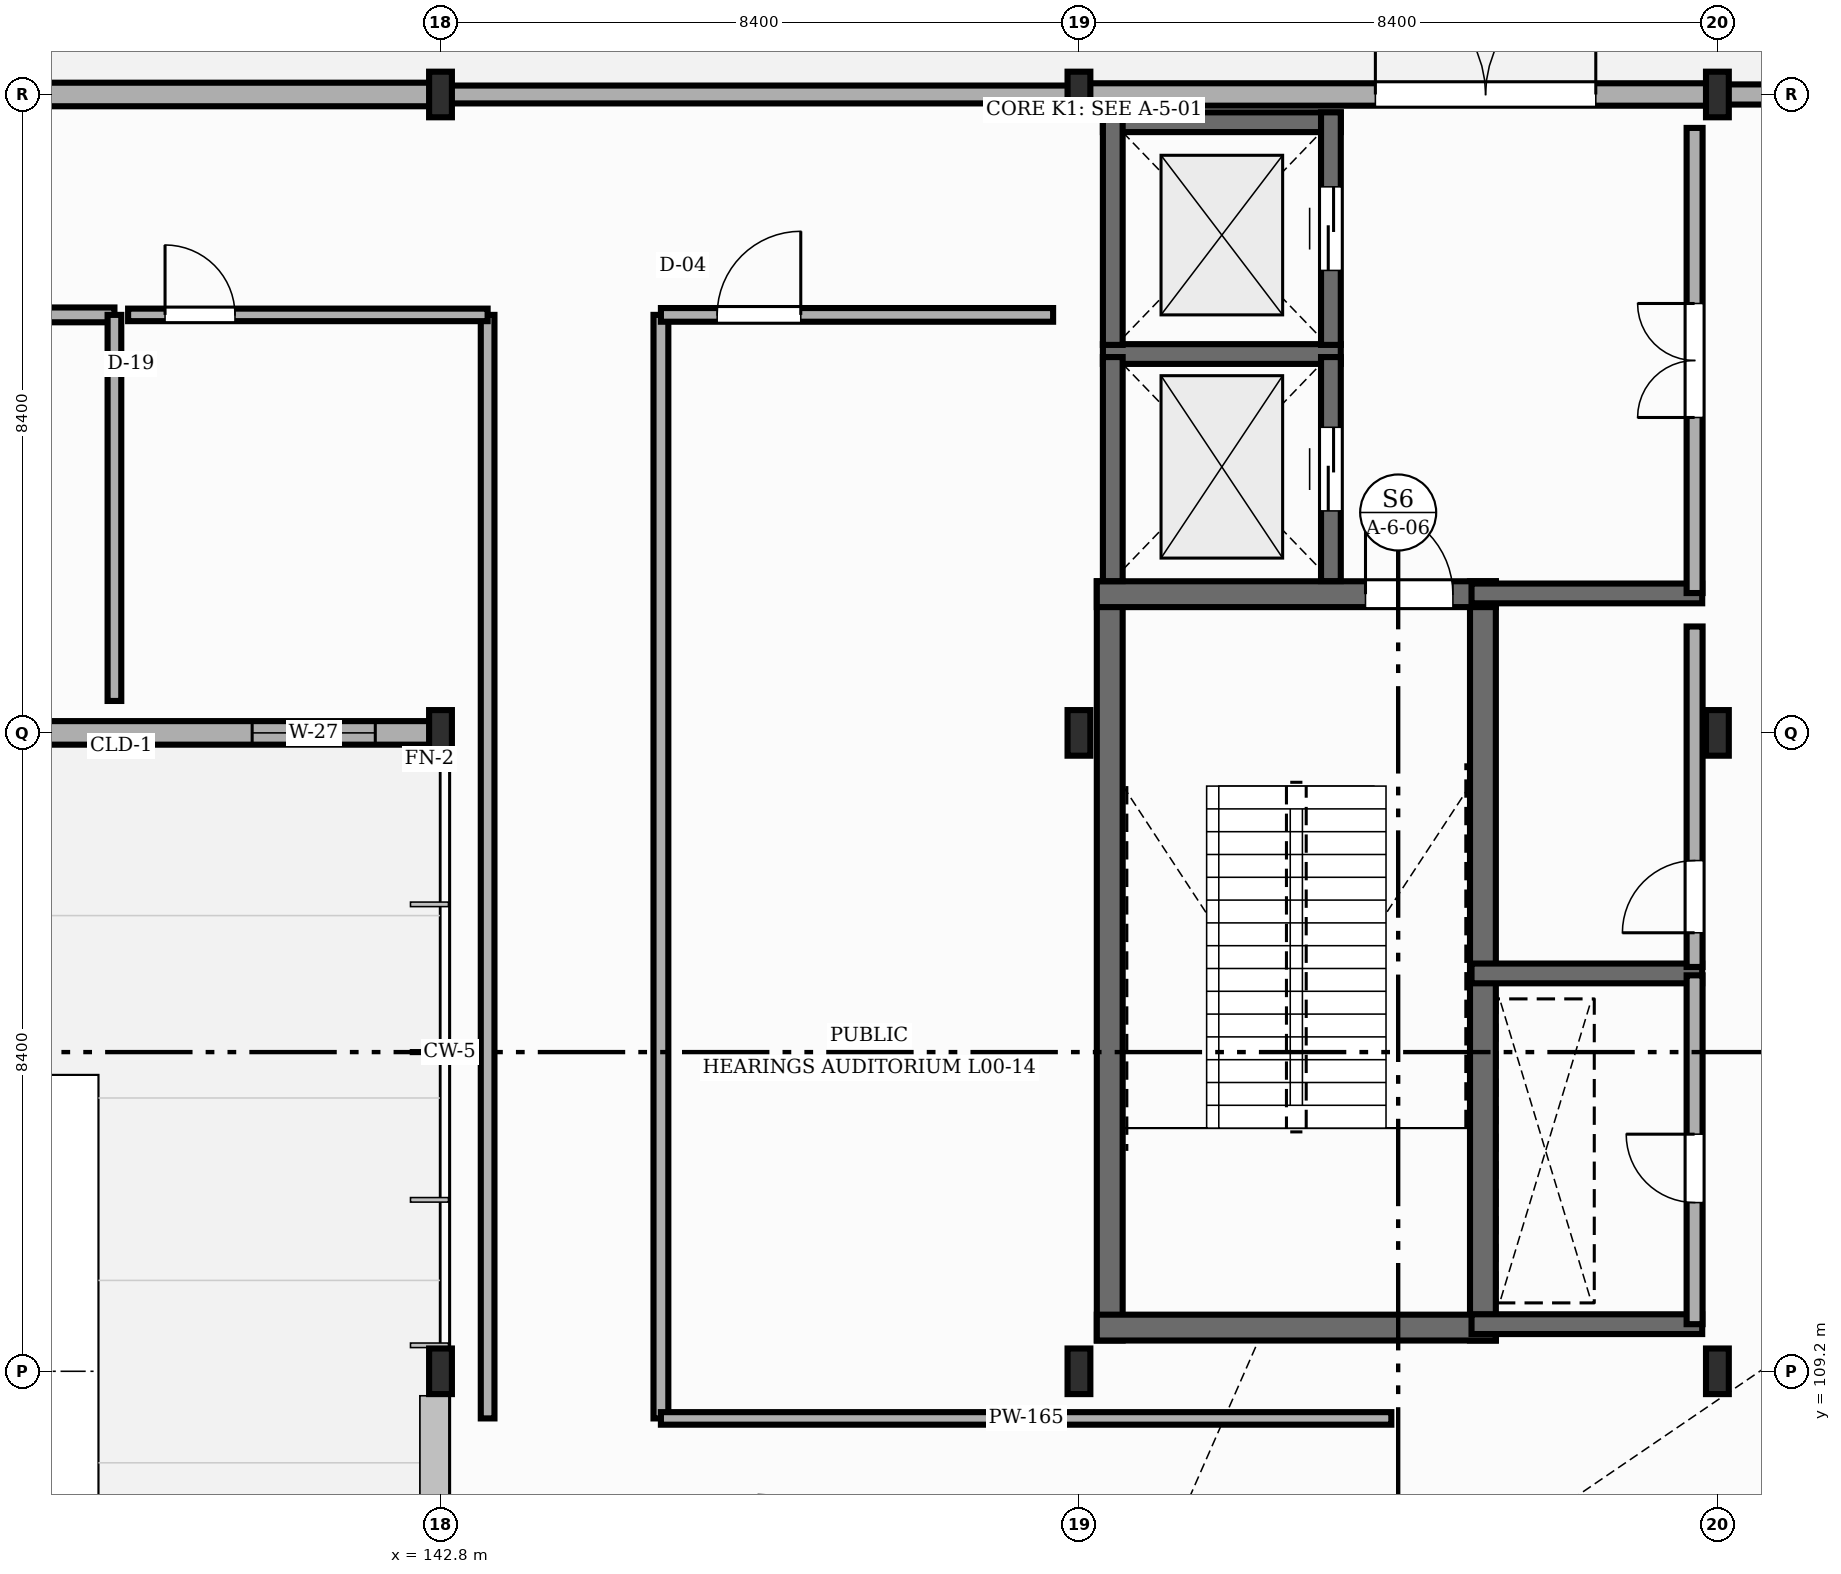
"""IFC4 building model, lengths in metres.
Left out: names, types, materials, properties, quantities, classifications, styles, units other than length and angle.
Written with IfcOpenShell. Run it as: python <this file> out.ifc"""

import sys

from ifc_helpers import new_model, si_unit, direction, frame, frame_2d, origin, origin_2d, place, context, subcontext, project, spatial, rectangle, i_section, extrude, element, fill, save


model = new_model("IFC4")
c1 = context("Model", 3, precision=1e-05, world=origin(), true_north=direction((0.0, 1.0)))
c2 = subcontext(c1, "Body", "Model", "MODEL_VIEW")
j1 = project(units=[si_unit("LENGTHUNIT", "METRE"), si_unit("PLANEANGLEUNIT", "RADIAN")], contexts=[c1])
p1 = place(None, origin())
s1 = spatial("IfcSite", under=j1, at=p1, CompositionType="ELEMENT")
p2 = place(p1, origin())
s2 = spatial("IfcBuilding", under=s1, at=p2, CompositionType="ELEMENT")
p3 = place(p2, origin())
s3 = spatial("IfcBuildingStorey", under=s2, at=p3, CompositionType="ELEMENT", Elevation=0.0)
for number, where, z_axis, x_axis in (
    (1, (142.8, 109.2, 0.0), (0.0, 0.0, 1.0), (1.0, 0.0, 0.0)),
    (2, (142.8, 117.6, 0.0), (0.0, 0.0, 1.0), (1.0, 0.0, 0.0)),
    (3, (142.8, 126.0, 0.0), (0.0, 0.0, 1.0), (1.0, 0.0, 0.0)),
    (4, (151.2, 109.2, 0.0), (0.0, 0.0, 1.0), (1.0, 0.0, 0.0)),
    (5, (151.2, 117.6, 0.0), (0.0, 0.0, 1.0), (1.0, 0.0, 0.0)),
    (6, (151.2, 126.0, 0.0), (0.0, 0.0, 1.0), (1.0, 0.0, 0.0)),
    (7, (159.6, 109.2, 0.0), (0.0, 0.0, 1.0), (1.0, 0.0, 0.0)),
    (8, (159.6, 117.6, 0.0), (0.0, 0.0, 1.0), (1.0, 0.0, 0.0)),
    (9, (159.6, 126.0, 0.0), (0.0, 0.0, 1.0), (1.0, 0.0, 0.0)),
):
    element("IfcColumn", number, at=place(p3, frame(where, z_axis=z_axis, x_axis=x_axis)), inside=s3, PredefinedType="COLUMN", context=c2, shape_type="SweptSolid", body=[
        extrude(i_section(OverallWidth=0.3, OverallDepth=0.6, WebThickness=0.015, FlangeThickness=0.03, FilletRadius=0.027, at=origin_2d()), origin(), (0.0, 0.0, 1.0), 5.4),
    ])
p4 = place(p3, frame((134.408, 117.6, 0.0), z_axis=(0.0, 0.0, 1.0), x_axis=(1.0, 0.0, 0.0)))
e10 = element("IfcWall", 10, at=p4, inside=s3, PredefinedType="STANDARD", context=c2, shape_type="SweptSolid", body=[
    extrude(rectangle(XDim=8.384, YDim=0.31, at=frame_2d((4.192, 0.0))), origin(), (0.0, 0.0, 1.0), 4.797),
])
p5 = place(p4, frame((0.85, 0.0, 0.9)))
e11 = element("IfcOpeningElement", 11, at=p5, cuts=e10, PredefinedType="OPENING", context=c2, shape_type="SweptSolid", body=[
    extrude(rectangle(XDim=1.52, YDim=1.45, at=frame_2d((0.76, 0.725))), frame((0.0, 0.165, 0.0), z_axis=(0.0, -1.0, 0.0), x_axis=(1.0, 0.0, 0.0)), (0.0, 0.0, 1.0), 0.33),
])
p6 = place(p4, frame((5.914, 0.0, 0.9)))
e12 = element("IfcOpeningElement", 12, at=p6, cuts=e10, PredefinedType="OPENING", context=c2, shape_type="SweptSolid", body=[
    extrude(rectangle(XDim=1.62, YDim=1.45, at=frame_2d((0.81, 0.725))), frame((0.0, 0.165, 0.0), z_axis=(0.0, -1.0, 0.0), x_axis=(1.0, 0.0, 0.0)), (0.0, 0.0, 1.0), 0.33),
])
p7 = place(p3, frame((167.992, 126.0, 0.0), z_axis=(0.0, 0.0, 1.0), x_axis=(-1.0, 0.0, 0.0)))
e13 = element("IfcWall", 13, at=p7, inside=s3, PredefinedType="STANDARD", context=c2, shape_type="SweptSolid", body=[
    extrude(rectangle(XDim=8.384, YDim=0.265, at=frame_2d((4.192, 0.0))), origin(), (0.0, 0.0, 1.0), 4.797),
])
p8 = place(p3, frame((151.208, 126.0, 0.0), z_axis=(0.0, 0.0, 1.0), x_axis=(1.0, 0.0, 0.0)))
e14 = element("IfcWall", 14, at=p8, inside=s3, PredefinedType="STANDARD", context=c2, shape_type="SweptSolid", body=[
    extrude(rectangle(XDim=8.384, YDim=0.295, at=frame_2d((4.192, 0.0))), origin(), (0.0, 0.0, 1.0), 4.827),
])
p9 = place(p8, frame((3.892, 0.0, 0.0)))
e15 = element("IfcOpeningElement", 15, at=p9, cuts=e14, PredefinedType="OPENING", context=c2, shape_type="SweptSolid", body=[
    extrude(rectangle(XDim=2.9, YDim=2.38, at=frame_2d((1.45, 1.19))), frame((0.0, 0.157, 0.0), z_axis=(0.0, -1.0, 0.0), x_axis=(1.0, 0.0, 0.0)), (0.0, 0.0, 1.0), 0.315),
])
p10 = place(p3, frame((151.192, 126.0, 0.0), z_axis=(0.0, 0.0, 1.0), x_axis=(-1.0, 0.0, 0.0)))
e16 = element("IfcWall", 16, at=p10, inside=s3, PredefinedType="STANDARD", context=c2, shape_type="SweptSolid", body=[
    extrude(rectangle(XDim=8.384, YDim=0.235, at=frame_2d((4.192, 0.0))), origin(), (0.0, 0.0, 1.0), 4.797),
])
p11 = place(p3, frame((142.792, 126.0, 0.0), z_axis=(0.0, 0.0, 1.0), x_axis=(-1.0, 0.0, 0.0)))
e17 = element("IfcWall", 17, at=p11, inside=s3, PredefinedType="STANDARD", context=c2, shape_type="SweptSolid", body=[
    extrude(rectangle(XDim=8.384, YDim=0.31, at=frame_2d((4.192, 0.0))), origin(), (0.0, 0.0, 1.0), 4.827),
])
for number, where, z_axis, x_axis in (
    (18, (151.605, 109.605, 0.0), (0.0, 0.0, 1.0), (0.0, 1.0, 0.0)),
    (19, (156.515, 109.605, 0.0), (0.0, 0.0, 1.0), (0.0, 1.0, 0.0)),
):
    element("IfcWall", number, at=place(p3, frame(where, z_axis=z_axis, x_axis=x_axis)), inside=s3, PredefinedType="SHEAR", context=c2, shape_type="SweptSolid", body=[
        extrude(rectangle(XDim=9.99, YDim=0.34, at=frame_2d((4.995, 0.0))), origin(), (0.0, 0.0, 1.0), 5.175),
    ])
p12 = place(p3, frame((151.435, 109.775, 0.0), z_axis=(0.0, 0.0, 1.0), x_axis=(1.0, 0.0, 0.0)))
e20 = element("IfcWall", 20, at=p12, inside=s3, PredefinedType="SHEAR", context=c2, shape_type="SweptSolid", body=[
    extrude(rectangle(XDim=5.25, YDim=0.34, at=frame_2d((2.625, 0.0))), origin(), (0.0, 0.0, 1.0), 5.175),
])
p13 = place(p3, frame((151.435, 119.425, 0.0), z_axis=(0.0, 0.0, 1.0), x_axis=(1.0, 0.0, 0.0)))
e21 = element("IfcWall", 21, at=p13, inside=s3, PredefinedType="SHEAR", context=c2, shape_type="SweptSolid", body=[
    extrude(rectangle(XDim=5.25, YDim=0.34, at=frame_2d((2.625, 0.0))), origin(), (0.0, 0.0, 1.0), 5.175),
])
p14 = place(p13, frame((3.535, 0.0, 0.0)))
e22 = element("IfcOpeningElement", 22, at=p14, cuts=e21, PredefinedType="OPENING", context=c2, shape_type="SweptSolid", body=[
    extrude(rectangle(XDim=1.15, YDim=2.15, at=frame_2d((0.575, 1.075))), frame((0.0, 0.18, 0.0), z_axis=(0.0, -1.0, 0.0), x_axis=(1.0, 0.0, 0.0)), (0.0, 0.0, 1.0), 0.36),
])
p15 = place(p3, frame((151.515, 122.585, 0.0), z_axis=(0.0, 0.0, 1.0), x_axis=(1.0, 0.0, 0.0)))
e23 = element("IfcWall", 23, at=p15, inside=s3, PredefinedType="SHEAR", context=c2, shape_type="SweptSolid", body=[
    extrude(rectangle(XDim=3.13, YDim=0.26, at=frame_2d((1.565, 0.0))), origin(), (0.0, 0.0, 1.0), 5.175),
])
p16 = place(p3, frame((151.645, 119.597, 0.0), z_axis=(0.0, 0.0, 1.0), x_axis=(0.0, 1.0, 0.0)))
e24 = element("IfcWall", 24, at=p16, inside=s3, PredefinedType="SHEAR", context=c2, shape_type="SweptSolid", body=[
    extrude(rectangle(XDim=2.948, YDim=0.26, at=frame_2d((1.474, 0.0))), origin(), (0.0, 0.0, 1.0), 5.175),
])
p17 = place(p3, frame((154.515, 119.597, 0.0), z_axis=(0.0, 0.0, 1.0), x_axis=(0.0, 1.0, 0.0)))
e25 = element("IfcWall", 25, at=p17, inside=s3, PredefinedType="SHEAR", context=c2, shape_type="SweptSolid", body=[
    extrude(rectangle(XDim=2.948, YDim=0.26, at=frame_2d((1.474, 0.0))), origin(), (0.0, 0.0, 1.0), 5.175),
])
p18 = place(p17, frame((0.924, 0.0, 0.0)))
e26 = element("IfcOpeningElement", 26, at=p18, cuts=e25, PredefinedType="OPENING", context=c2, shape_type="SweptSolid", body=[
    extrude(rectangle(XDim=1.1, YDim=2.15, at=frame_2d((0.55, 1.075))), frame((0.0, 0.14, 0.0), z_axis=(0.0, -1.0, 0.0), x_axis=(1.0, 0.0, 0.0)), (0.0, 0.0, 1.0), 0.28),
])
p19 = place(p3, frame((151.515, 125.635, 0.0), z_axis=(0.0, 0.0, 1.0), x_axis=(1.0, 0.0, 0.0)))
e27 = element("IfcWall", 27, at=p19, inside=s3, PredefinedType="SHEAR", context=c2, shape_type="SweptSolid", body=[
    extrude(rectangle(XDim=3.13, YDim=0.26, at=frame_2d((1.565, 0.0))), origin(), (0.0, 0.0, 1.0), 5.175),
])
p20 = place(p3, frame((151.645, 122.705, 0.0), z_axis=(0.0, 0.0, 1.0), x_axis=(0.0, 1.0, 0.0)))
e28 = element("IfcWall", 28, at=p20, inside=s3, PredefinedType="SHEAR", context=c2, shape_type="SweptSolid", body=[
    extrude(rectangle(XDim=3.06, YDim=0.26, at=frame_2d((1.53, 0.0))), origin(), (0.0, 0.0, 1.0), 5.175),
])
p21 = place(p3, frame((154.515, 122.705, 0.0), z_axis=(0.0, 0.0, 1.0), x_axis=(0.0, 1.0, 0.0)))
e29 = element("IfcWall", 29, at=p21, inside=s3, PredefinedType="SHEAR", context=c2, shape_type="SweptSolid", body=[
    extrude(rectangle(XDim=3.06, YDim=0.26, at=frame_2d((1.53, 0.0))), origin(), (0.0, 0.0, 1.0), 5.175),
])
p22 = place(p21, frame((0.98, 0.0, 0.0)))
e30 = element("IfcOpeningElement", 30, at=p22, cuts=e29, PredefinedType="OPENING", context=c2, shape_type="SweptSolid", body=[
    extrude(rectangle(XDim=1.1, YDim=2.15, at=frame_2d((0.55, 1.075))), frame((0.0, 0.14, 0.0), z_axis=(0.0, -1.0, 0.0), x_axis=(1.0, 0.0, 0.0)), (0.0, 0.0, 1.0), 0.28),
])
for number, where, z_axis, x_axis in (
    (31, (156.365, 109.82, 0.0), (0.0, 0.0, 1.0), (1.0, 0.0, 0.0)),
    (32, (156.365, 114.435, 0.0), (0.0, 0.0, 1.0), (1.0, 0.0, 0.0)),
    (33, (156.365, 119.435, 0.0), (0.0, 0.0, 1.0), (1.0, 0.0, 0.0)),
):
    element("IfcWall", number, at=place(p3, frame(where, z_axis=z_axis, x_axis=x_axis)), inside=s3, PredefinedType="SHEAR", context=c2, shape_type="SweptSolid", body=[
        extrude(rectangle(XDim=3.035, YDim=0.26, at=frame_2d((1.518, 0.0))), origin(), (0.0, 0.0, 1.0), 5.175),
    ])
p23 = place(p3, frame((159.3, 109.82, 0.0), z_axis=(0.0, 0.0, 1.0), x_axis=(0.0, 1.0, 0.0)))
e34 = element("IfcWall", 34, at=p23, inside=s3, PredefinedType="STANDARD", context=c2, shape_type="SweptSolid", body=[
    extrude(rectangle(XDim=4.59, YDim=0.21, at=frame_2d((2.295, 0.0))), origin(), (0.0, 0.0, 1.0), 4.847),
])
p24 = place(p23, frame((1.6, 0.0, 0.0)))
e35 = element("IfcOpeningElement", 35, at=p24, cuts=e34, PredefinedType="OPENING", context=c2, shape_type="SweptSolid", body=[
    extrude(rectangle(XDim=0.9, YDim=2.1, at=frame_2d((0.45, 1.05))), frame((0.0, 0.115, 0.0), z_axis=(0.0, -1.0, 0.0), x_axis=(1.0, 0.0, 0.0)), (0.0, 0.0, 1.0), 0.23),
])
p25 = place(p3, frame((159.3, 114.52, 0.0), z_axis=(0.0, 0.0, 1.0), x_axis=(0.0, 1.0, 0.0)))
e36 = element("IfcWall", 36, at=p25, inside=s3, PredefinedType="STANDARD", context=c2, shape_type="SweptSolid", body=[
    extrude(rectangle(XDim=4.48, YDim=0.21, at=frame_2d((2.24, 0.0))), origin(), (0.0, 0.0, 1.0), 4.557),
])
p26 = place(p25, frame((0.45, 0.0, 0.0)))
e37 = element("IfcOpeningElement", 37, at=p26, cuts=e36, PredefinedType="OPENING", context=c2, shape_type="SweptSolid", body=[
    extrude(rectangle(XDim=0.95, YDim=2.15, at=frame_2d((0.475, 1.075))), frame((0.0, 0.115, 0.0), z_axis=(0.0, -1.0, 0.0), x_axis=(1.0, 0.0, 0.0)), (0.0, 0.0, 1.0), 0.23),
])
p27 = place(p3, frame((159.3, 119.44, 0.0), z_axis=(0.0, 0.0, 1.0), x_axis=(0.0, 1.0, 0.0)))
e38 = element("IfcWall", 38, at=p27, inside=s3, PredefinedType="STANDARD", context=c2, shape_type="SweptSolid", body=[
    extrude(rectangle(XDim=6.12, YDim=0.21, at=frame_2d((3.06, 0.0))), origin(), (0.0, 0.0, 1.0), 4.557),
])
p28 = place(p27, frame((2.31, 0.0, 0.0)))
e39 = element("IfcOpeningElement", 39, at=p28, cuts=e38, PredefinedType="OPENING", context=c2, shape_type="SweptSolid", body=[
    extrude(rectangle(XDim=1.5, YDim=2.2, at=frame_2d((0.75, 1.1))), frame((0.0, 0.115, 0.0), z_axis=(0.0, -1.0, 0.0), x_axis=(1.0, 0.0, 0.0)), (0.0, 0.0, 1.0), 0.23),
])
p29 = place(p3, frame((145.7, 108.58, -0.004), z_axis=(0.0, 0.0, 1.0), x_axis=(0.0, 1.0, 0.0)))
e40 = element("IfcWall", 40, at=p29, inside=s3, PredefinedType="STANDARD", context=c2, shape_type="SweptSolid", body=[
    extrude(rectangle(XDim=14.52, YDim=0.195, at=frame_2d((7.26, 0.0))), origin(), (0.0, 0.0, 1.0), 4.861),
])
p30 = place(p3, frame((145.7, 123.1, -0.004), z_axis=(0.0, 0.0, 1.0), x_axis=(1.0, 0.0, 0.0)))
e41 = element("IfcWall", 41, at=p30, inside=s3, PredefinedType="STANDARD", context=c2, shape_type="SweptSolid", body=[
    extrude(rectangle(XDim=5.16, YDim=0.18, at=frame_2d((2.58, 0.0))), origin(), (0.0, 0.0, 1.0), 5.179),
])
p31 = place(p30, frame((0.74, 0.0, 0.0)))
e42 = element("IfcOpeningElement", 42, at=p31, cuts=e41, PredefinedType="OPENING", context=c2, shape_type="SweptSolid", body=[
    extrude(rectangle(XDim=1.1, YDim=2.06, at=frame_2d((0.55, 1.03))), frame((0.0, 0.1, 0.0), z_axis=(0.0, -1.0, 0.0), x_axis=(1.0, 0.0, 0.0)), (0.0, 0.0, 1.0), 0.2),
])
p32 = place(p3, frame((155.31, 108.58, -0.004), z_axis=(0.0, 0.0, 1.0), x_axis=(-1.0, 0.0, 0.0)))
e43 = element("IfcWall", 43, at=p32, inside=s3, PredefinedType="STANDARD", context=c2, shape_type="SweptSolid", body=[
    extrude(rectangle(XDim=9.61, YDim=0.165, at=frame_2d((4.805, 0.0))), origin(), (0.0, 0.0, 1.0), 5.179),
])
p33 = place(p3, frame((123.18, 123.1, -0.004), z_axis=(0.0, 0.0, 1.0), x_axis=(1.0, 0.0, 0.0)))
e44 = element("IfcWall", 44, at=p33, inside=s3, PredefinedType="STANDARD", context=c2, shape_type="SweptSolid", body=[
    extrude(rectangle(XDim=15.33, YDim=0.195, at=frame_2d((7.665, 0.0))), origin(), (0.0, 0.0, 1.0), 5.179),
])
p34 = place(p3, frame((138.51, 123.1, -0.004), z_axis=(0.0, 0.0, 1.0), x_axis=(0.0, -1.0, 0.0)))
e45 = element("IfcWall", 45, at=p34, inside=s3, PredefinedType="STANDARD", context=c2, shape_type="SweptSolid", body=[
    extrude(rectangle(XDim=5.08, YDim=0.18, at=frame_2d((2.54, 0.0))), origin(), (0.0, 0.0, 1.0), 5.179),
])
p35 = place(p3, frame((143.42, 123.1, -0.004), z_axis=(0.0, 0.0, 1.0), x_axis=(0.0, -1.0, 0.0)))
e46 = element("IfcWall", 46, at=p35, inside=s3, PredefinedType="STANDARD", context=c2, shape_type="SweptSolid", body=[
    extrude(rectangle(XDim=14.52, YDim=0.18, at=frame_2d((7.26, 0.0))), origin(), (0.0, 0.0, 1.0), 5.179),
])
p36 = place(p3, frame((138.69, 123.1, -0.004), z_axis=(0.0, 0.0, 1.0), x_axis=(1.0, 0.0, 0.0)))
e47 = element("IfcWall", 47, at=p36, inside=s3, PredefinedType="STANDARD", context=c2, shape_type="SweptSolid", body=[
    extrude(rectangle(XDim=4.73, YDim=0.165, at=frame_2d((2.365, 0.0))), origin(), (0.0, 0.0, 1.0), 5.179),
])
p37 = place(p36, frame((0.486, 0.0, 0.0)))
e48 = element("IfcOpeningElement", 48, at=p37, cuts=e47, PredefinedType="OPENING", context=c2, shape_type="SweptSolid", body=[
    extrude(rectangle(XDim=0.92, YDim=2.22, at=frame_2d((0.46, 1.11))), frame((0.0, 0.093, 0.0), z_axis=(0.0, -1.0, 0.0), x_axis=(1.0, 0.0, 0.0)), (0.0, 0.0, 1.0), 0.185),
])
p38 = place(p6, origin())
e49 = element("IfcWindow", 49, at=p38, inside=s3, PartitioningType="SINGLE_PANEL", PredefinedType="WINDOW", context=c2, shape_type="SweptSolid", body=[
    extrude(rectangle(XDim=1.62, YDim=1.45, at=frame_2d((0.81, 0.725))), frame((0.0, 0.03, 0.0), z_axis=(0.0, -1.0, 0.0), x_axis=(1.0, 0.0, 0.0)), (0.0, 0.0, 1.0), 0.06),
])
fill(e12, e49)
p39 = place(p9, origin())
e50 = element("IfcDoor", 50, at=p39, inside=s3, OperationType="DOUBLE_DOOR_SINGLE_SWING", PredefinedType="DOOR", context=c2, shape_type="SweptSolid", body=[
    extrude(rectangle(XDim=2.9, YDim=2.38, at=frame_2d((1.45, 1.19))), frame((0.0, 0.025, 0.0), z_axis=(0.0, -1.0, 0.0), x_axis=(1.0, 0.0, 0.0)), (0.0, 0.0, 1.0), 0.05),
])
fill(e15, e50)
p40 = place(p14, origin())
e51 = element("IfcDoor", 51, at=p40, inside=s3, OperationType="SINGLE_SWING_LEFT", PredefinedType="DOOR", context=c2, shape_type="SweptSolid", body=[
    extrude(rectangle(XDim=1.15, YDim=2.15, at=frame_2d((0.575, 1.075))), frame((0.0, 0.025, 0.0), z_axis=(0.0, -1.0, 0.0), x_axis=(1.0, 0.0, 0.0)), (0.0, 0.0, 1.0), 0.05),
])
fill(e22, e51)
p41 = place(p18, origin())
e52 = element("IfcDoor", 52, at=p41, inside=s3, OperationType="DOUBLE_DOOR_SLIDING", PredefinedType="DOOR", context=c2, shape_type="SweptSolid", body=[
    extrude(rectangle(XDim=1.1, YDim=2.15, at=frame_2d((0.55, 1.075))), frame((0.0, 0.025, 0.0), z_axis=(0.0, -1.0, 0.0), x_axis=(1.0, 0.0, 0.0)), (0.0, 0.0, 1.0), 0.05),
])
fill(e26, e52)
p42 = place(p22, origin())
e53 = element("IfcDoor", 53, at=p42, inside=s3, OperationType="DOUBLE_DOOR_SLIDING", PredefinedType="DOOR", context=c2, shape_type="SweptSolid", body=[
    extrude(rectangle(XDim=1.1, YDim=2.15, at=frame_2d((0.55, 1.075))), frame((0.0, 0.025, 0.0), z_axis=(0.0, -1.0, 0.0), x_axis=(1.0, 0.0, 0.0)), (0.0, 0.0, 1.0), 0.05),
])
fill(e30, e53)
p43 = place(p24, origin())
e54 = element("IfcDoor", 54, at=p43, inside=s3, OperationType="SINGLE_SWING_RIGHT", PredefinedType="DOOR", context=c2, shape_type="SweptSolid", body=[
    extrude(rectangle(XDim=0.9, YDim=2.1, at=frame_2d((0.45, 1.05))), frame((0.0, 0.025, 0.0), z_axis=(0.0, -1.0, 0.0), x_axis=(1.0, 0.0, 0.0)), (0.0, 0.0, 1.0), 0.05),
])
fill(e35, e54)
p44 = place(p26, origin())
e55 = element("IfcDoor", 55, at=p44, inside=s3, OperationType="SINGLE_SWING_LEFT", PredefinedType="DOOR", context=c2, shape_type="SweptSolid", body=[
    extrude(rectangle(XDim=0.95, YDim=2.15, at=frame_2d((0.475, 1.075))), frame((0.0, 0.025, 0.0), z_axis=(0.0, -1.0, 0.0), x_axis=(1.0, 0.0, 0.0)), (0.0, 0.0, 1.0), 0.05),
])
fill(e37, e55)
p45 = place(p28, origin())
e56 = element("IfcDoor", 56, at=p45, inside=s3, OperationType="DOUBLE_DOOR_SINGLE_SWING", PredefinedType="DOOR", context=c2, shape_type="SweptSolid", body=[
    extrude(rectangle(XDim=1.5, YDim=2.2, at=frame_2d((0.75, 1.1))), frame((0.0, 0.025, 0.0), z_axis=(0.0, -1.0, 0.0), x_axis=(1.0, 0.0, 0.0)), (0.0, 0.0, 1.0), 0.05),
])
fill(e39, e56)
p46 = place(p31, origin())
e57 = element("IfcDoor", 57, at=p46, inside=s3, OperationType="SINGLE_SWING_RIGHT", PredefinedType="DOOR", context=c2, shape_type="SweptSolid", body=[
    extrude(rectangle(XDim=1.1, YDim=2.06, at=frame_2d((0.55, 1.03))), frame((0.0, 0.025, 0.0), z_axis=(0.0, -1.0, 0.0), x_axis=(1.0, 0.0, 0.0)), (0.0, 0.0, 1.0), 0.05),
])
fill(e42, e57)
p47 = place(p37, origin())
e58 = element("IfcDoor", 58, at=p47, inside=s3, OperationType="SINGLE_SWING_LEFT", PredefinedType="DOOR", context=c2, shape_type="SweptSolid", body=[
    extrude(rectangle(XDim=0.92, YDim=2.22, at=frame_2d((0.46, 1.11))), frame((0.0, 0.025, 0.0), z_axis=(0.0, -1.0, 0.0), x_axis=(1.0, 0.0, 0.0)), (0.0, 0.0, 1.0), 0.05),
])
fill(e48, e58)
save(model, sys.argv[1])
